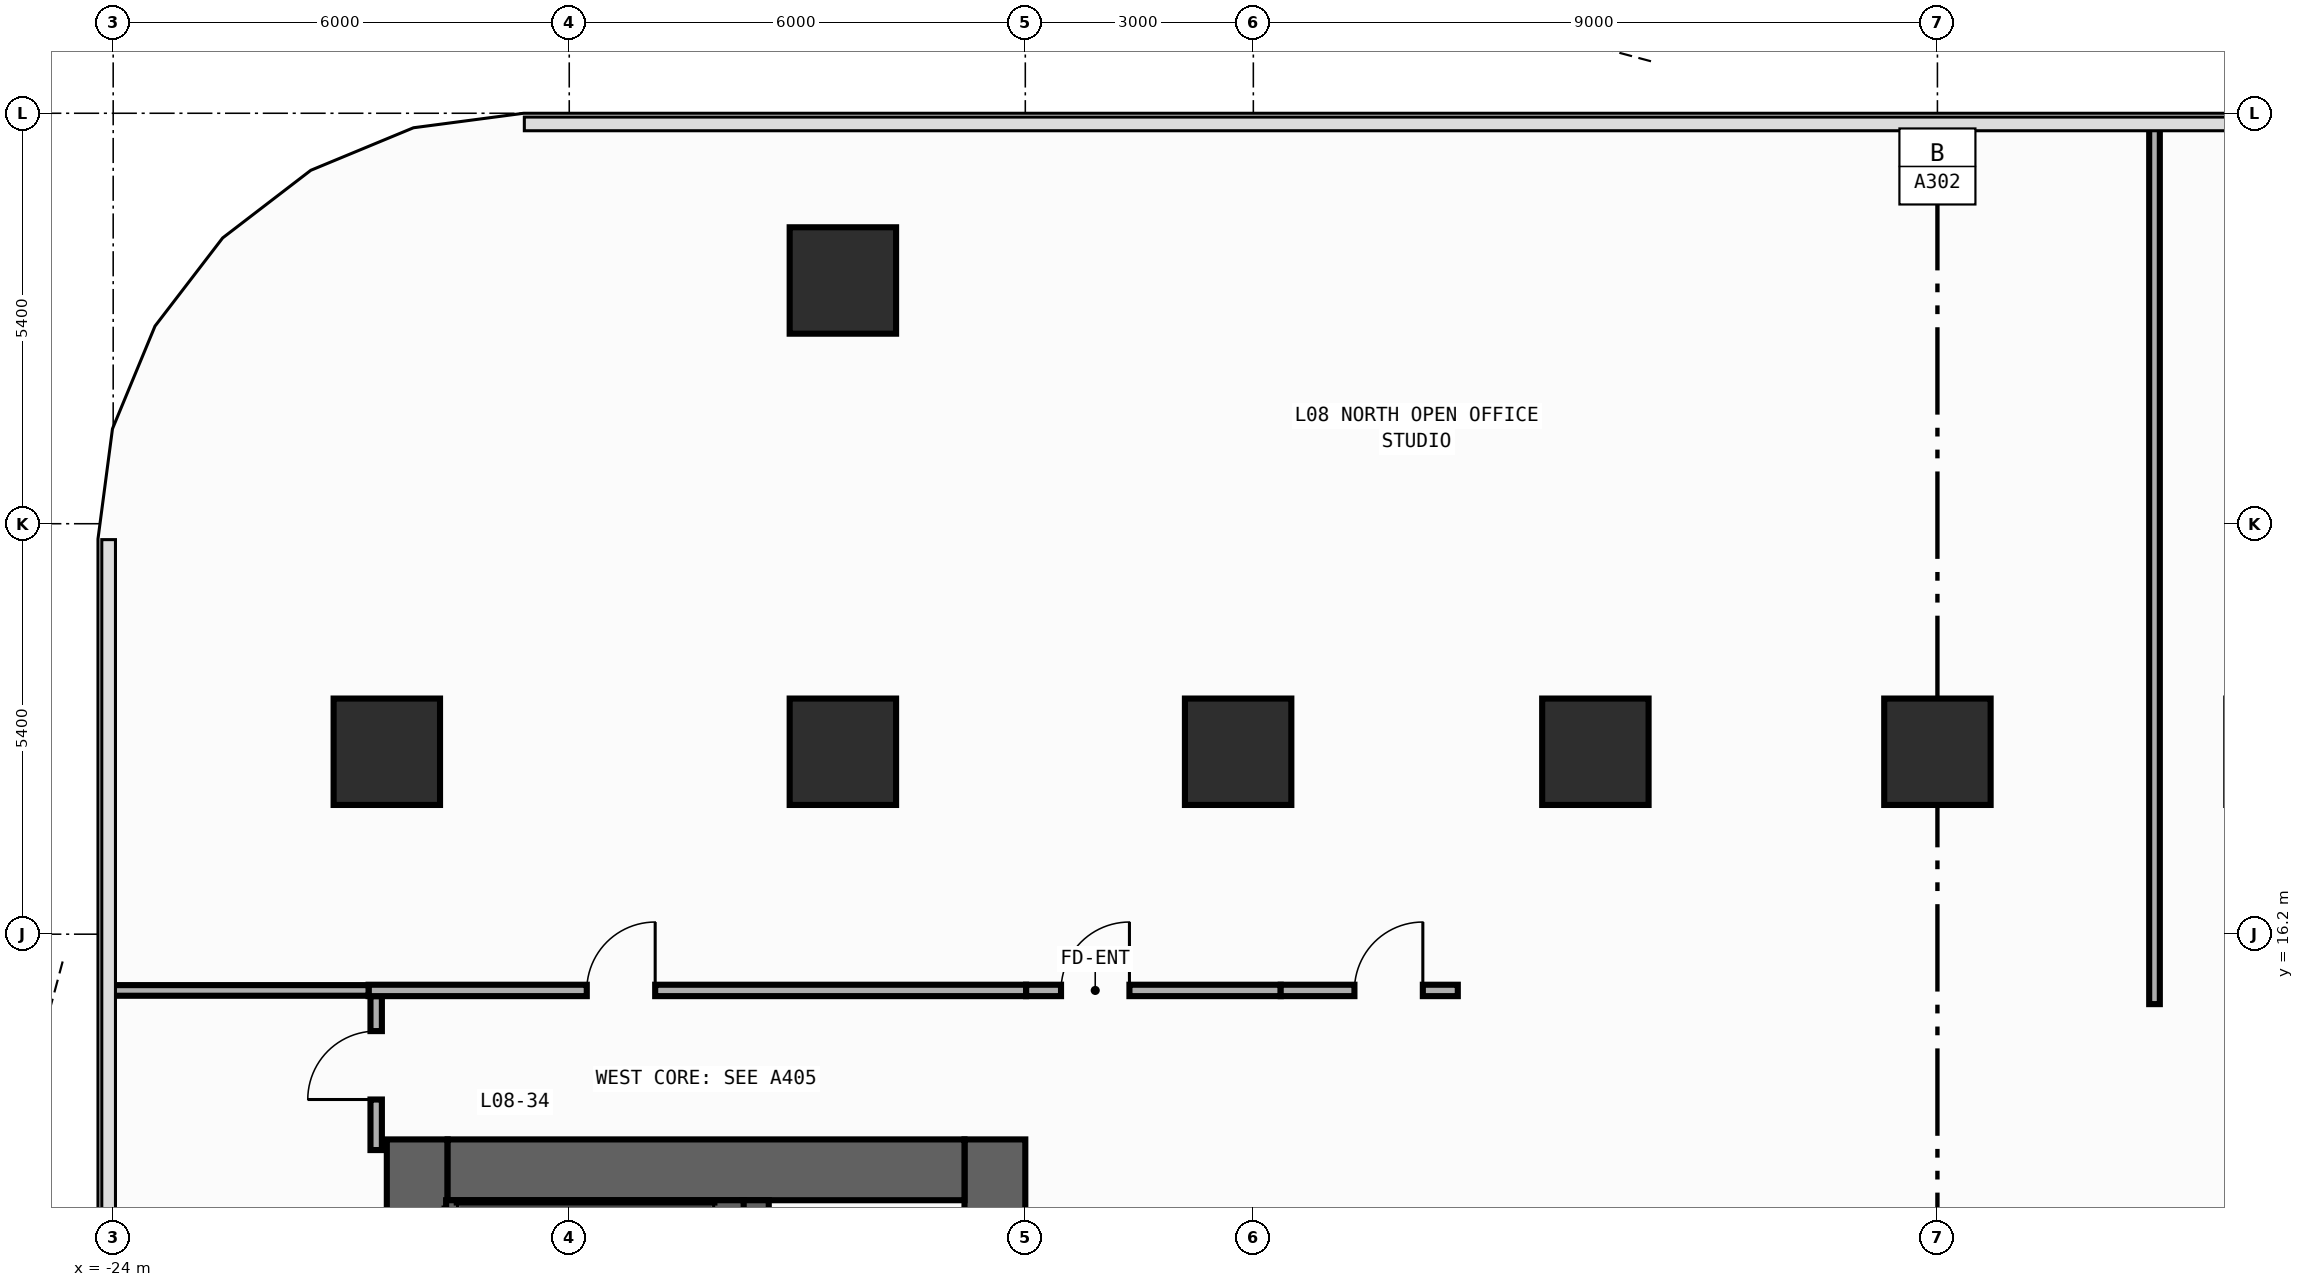
"""IFC4 building model, lengths in metres.
Left out: names, types, materials, properties, quantities, classifications, styles, units other than length and angle.
Written with IfcOpenShell. Run it as: python <this file> out.ifc"""

import sys

from ifc_helpers import new_model, si_unit, direction, frame, frame_2d, origin, origin_2d, place, context, subcontext, project, spatial, rectangle, extrude, element, fill, save


model = new_model("IFC4")
c1 = context("Model", 3, precision=1e-05, world=origin(), true_north=direction((0.0, 1.0)))
c2 = subcontext(c1, "Body", "Model", "MODEL_VIEW")
j1 = project(units=[si_unit("LENGTHUNIT", "METRE"), si_unit("PLANEANGLEUNIT", "RADIAN")], contexts=[c1])
p1 = place(None, origin())
s1 = spatial("IfcSite", under=j1, at=p1, CompositionType="ELEMENT")
p2 = place(p1, origin())
s2 = spatial("IfcBuilding", under=s1, at=p2, CompositionType="ELEMENT")
p3 = place(p2, frame((0.0, 0.0, 34.4)))
s3 = spatial("IfcBuildingStorey", under=s2, at=p3, CompositionType="ELEMENT", Elevation=34.4)
p4 = place(p3, frame((-20.0, -13.5, 0.0), z_axis=(0.0, 0.0, 1.0), x_axis=(0.0, 1.0, 0.0)))
e1 = element("IfcWall", 1, at=p4, inside=s3, PredefinedType="SHEAR", context=c2, shape_type="SweptSolid", body=[
    extrude(rectangle(XDim=27.0, YDim=0.8, at=frame_2d((13.5, 0.0))), origin(), (0.0, 0.0, 1.0), 3.94),
])
p5 = place(p3, frame((-12.4, -13.5, 0.0), z_axis=(0.0, 0.0, 1.0), x_axis=(0.0, 1.0, 0.0)))
e2 = element("IfcWall", 2, at=p5, inside=s3, PredefinedType="SHEAR", context=c2, shape_type="SweptSolid", body=[
    extrude(rectangle(XDim=27.0, YDim=0.8, at=frame_2d((13.5, 0.0))), origin(), (0.0, 0.0, 1.0), 3.94),
])
p6 = place(p5, frame((21.55, 0.0, 0.0)))
e3 = element("IfcOpeningElement", 3, at=p6, cuts=e2, PredefinedType="OPENING", context=c2, shape_type="SweptSolid", body=[
    extrude(rectangle(XDim=1.1, YDim=2.2, at=frame_2d((0.55, 1.1))), frame((0.0, 0.41, 0.0), z_axis=(0.0, -1.0, 0.0), x_axis=(1.0, 0.0, 0.0)), (0.0, 0.0, 1.0), 0.82),
])
p7 = place(p5, frame((18.35, 0.0, 0.0)))
e4 = element("IfcOpeningElement", 4, at=p7, cuts=e2, PredefinedType="OPENING", context=c2, shape_type="SweptSolid", body=[
    extrude(rectangle(XDim=1.1, YDim=2.2, at=frame_2d((0.55, 1.1))), frame((0.0, 0.41, 0.0), z_axis=(0.0, -1.0, 0.0), x_axis=(1.0, 0.0, 0.0)), (0.0, 0.0, 1.0), 0.82),
])
p8 = place(p5, frame((15.15, 0.0, 0.0)))
e5 = element("IfcOpeningElement", 5, at=p8, cuts=e2, PredefinedType="OPENING", context=c2, shape_type="SweptSolid", body=[
    extrude(rectangle(XDim=1.1, YDim=2.2, at=frame_2d((0.55, 1.1))), frame((0.0, 0.41, 0.0), z_axis=(0.0, -1.0, 0.0), x_axis=(1.0, 0.0, 0.0)), (0.0, 0.0, 1.0), 0.82),
])
p9 = place(p5, frame((10.35, 0.0, 0.0)))
e6 = element("IfcOpeningElement", 6, at=p9, cuts=e2, PredefinedType="OPENING", context=c2, shape_type="SweptSolid", body=[
    extrude(rectangle(XDim=1.1, YDim=2.2, at=frame_2d((0.55, 1.1))), frame((0.0, 0.41, 0.0), z_axis=(0.0, -1.0, 0.0), x_axis=(1.0, 0.0, 0.0)), (0.0, 0.0, 1.0), 0.82),
])
p10 = place(p5, frame((7.15, 0.0, 0.0)))
e7 = element("IfcOpeningElement", 7, at=p10, cuts=e2, PredefinedType="OPENING", context=c2, shape_type="SweptSolid", body=[
    extrude(rectangle(XDim=1.1, YDim=2.2, at=frame_2d((0.55, 1.1))), frame((0.0, 0.41, 0.0), z_axis=(0.0, -1.0, 0.0), x_axis=(1.0, 0.0, 0.0)), (0.0, 0.0, 1.0), 0.82),
])
p11 = place(p5, frame((3.95, 0.0, 0.0)))
e8 = element("IfcOpeningElement", 8, at=p11, cuts=e2, PredefinedType="OPENING", context=c2, shape_type="SweptSolid", body=[
    extrude(rectangle(XDim=1.1, YDim=2.2, at=frame_2d((0.55, 1.1))), frame((0.0, 0.41, 0.0), z_axis=(0.0, -1.0, 0.0), x_axis=(1.0, 0.0, 0.0)), (0.0, 0.0, 1.0), 0.82),
])
p12 = place(p5, frame((12.725, 0.0, 0.0)))
e9 = element("IfcOpeningElement", 9, at=p12, cuts=e2, PredefinedType="OPENING", context=c2, shape_type="SweptSolid", body=[
    extrude(rectangle(XDim=1.15, YDim=2.2, at=frame_2d((0.575, 1.1))), frame((0.0, 0.41, 0.0), z_axis=(0.0, -1.0, 0.0), x_axis=(1.0, 0.0, 0.0)), (0.0, 0.0, 1.0), 0.82),
])
p13 = place(p5, frame((1.625, 0.0, 0.0)))
e10 = element("IfcOpeningElement", 10, at=p13, cuts=e2, PredefinedType="OPENING", context=c2, shape_type="SweptSolid", body=[
    extrude(rectangle(XDim=0.85, YDim=2.1, at=frame_2d((0.425, 1.05))), frame((0.0, 0.41, 0.0), z_axis=(0.0, -1.0, 0.0), x_axis=(1.0, 0.0, 0.0)), (0.0, 0.0, 1.0), 0.82),
])
p14 = place(p3, frame((-19.6, 13.1, 0.0), z_axis=(0.0, 0.0, 1.0), x_axis=(1.0, 0.0, 0.0)))
e11 = element("IfcWall", 11, at=p14, inside=s3, PredefinedType="SHEAR", context=c2, shape_type="SweptSolid", body=[
    extrude(rectangle(XDim=6.8, YDim=0.8, at=frame_2d((3.4, 0.0))), origin(), (0.0, 0.0, 1.0), 3.94),
])
p15 = place(p3, frame((-15.55, -12.7, 0.0), z_axis=(0.0, 0.0, 1.0), x_axis=(0.0, 1.0, 0.0)))
e12 = element("IfcWall", 12, at=p15, inside=s3, PredefinedType="SHEAR", context=c2, shape_type="SweptSolid", body=[
    extrude(rectangle(XDim=25.4, YDim=0.35, at=frame_2d((12.7, 0.0))), origin(), (0.0, 0.0, 1.0), 3.94),
])
p16 = place(p15, frame((11.925, 0.0, 0.0)))
e13 = element("IfcOpeningElement", 13, at=p16, cuts=e12, PredefinedType="OPENING", context=c2, shape_type="SweptSolid", body=[
    extrude(rectangle(XDim=1.15, YDim=2.2, at=frame_2d((0.575, 1.1))), frame((0.0, 0.185, 0.0), z_axis=(0.0, -1.0, 0.0), x_axis=(1.0, 0.0, 0.0)), (0.0, 0.0, 1.0), 0.37),
])
p17 = place(p15, frame((0.825, 0.0, 0.0)))
e14 = element("IfcOpeningElement", 14, at=p17, cuts=e12, PredefinedType="OPENING", context=c2, shape_type="SweptSolid", body=[
    extrude(rectangle(XDim=0.85, YDim=2.1, at=frame_2d((0.425, 1.05))), frame((0.0, 0.185, 0.0), z_axis=(0.0, -1.0, 0.0), x_axis=(1.0, 0.0, 0.0)), (0.0, 0.0, 1.0), 0.37),
])
p18 = place(p3, frame((-19.62, 12.59, 0.0), z_axis=(0.0, 0.0, 1.0), x_axis=(1.0, 0.0, 0.0)))
e15 = element("IfcWall", 15, at=p18, inside=s3, PredefinedType="SHEAR", context=c2, shape_type="SweptSolid", body=[
    extrude(rectangle(XDim=3.915, YDim=0.22, at=frame_2d((1.958, 0.0))), origin(), (0.0, 0.0, 1.0), 3.94),
])
for number, where, z_axis, x_axis in (
    (16, (-9.2, 18.6, 0.0), (0.0, 0.0, 1.0), (1.0, 0.0, 0.0)),
    (17, (-20.4, 18.6, 0.0), (0.0, 0.0, 1.0), (1.0, 0.0, 0.0)),
    (18, (-14.4, 18.6, 0.0), (0.0, 0.0, 1.0), (1.0, 0.0, 0.0)),
    (19, (-4.5, 18.6, 0.0), (0.0, 0.0, 1.0), (1.0, 0.0, 0.0)),
    (20, (0.0, 18.6, 0.0), (0.0, 0.0, 1.0), (1.0, 0.0, 0.0)),
    (21, (-14.4, 24.8, 0.0), (0.0, 0.0, 1.0), (1.0, 0.0, 0.0)),
):
    element("IfcColumn", number, at=place(p3, frame(where, z_axis=z_axis, x_axis=x_axis)), inside=s3, PredefinedType="COLUMN", context=c2, shape_type="SweptSolid", body=[
        extrude(rectangle(XDim=1.4, YDim=1.4, at=origin_2d()), origin(), (0.0, 0.0, 1.0), 4.2),
    ])
p19 = place(p3, frame((-11.99, 15.46, 0.0), z_axis=(0.0, 0.0, 1.0), x_axis=(1.0, 0.0, 0.0)))
e22 = element("IfcWall", 22, at=p19, inside=s3, PredefinedType="PARTITIONING", context=c2, shape_type="SweptSolid", body=[
    extrude(rectangle(XDim=3.35, YDim=0.15, at=frame_2d((1.675, 0.0))), origin(), (0.0, 0.0, 1.0), 3.94),
])
p20 = place(p19, frame((0.46, 0.0, 0.0)))
e23 = element("IfcOpeningElement", 23, at=p20, cuts=e22, PredefinedType="OPENING", context=c2, shape_type="SweptSolid", body=[
    extrude(rectangle(XDim=0.9, YDim=2.15, at=frame_2d((0.45, 1.075))), frame((0.0, 0.085, 0.0), z_axis=(0.0, -1.0, 0.0), x_axis=(1.0, 0.0, 0.0)), (0.0, 0.0, 1.0), 0.17),
])
p21 = place(p3, frame((-8.64, 15.46, 0.0), z_axis=(0.0, 0.0, 1.0), x_axis=(1.0, 0.0, 0.0)))
e24 = element("IfcWall", 24, at=p21, inside=s3, PredefinedType="PARTITIONING", context=c2, shape_type="SweptSolid", body=[
    extrude(rectangle(XDim=2.33, YDim=0.15, at=frame_2d((1.165, 0.0))), origin(), (0.0, 0.0, 1.0), 3.94),
])
p22 = place(p21, frame((0.97, 0.0, 0.0)))
e25 = element("IfcOpeningElement", 25, at=p22, cuts=e24, PredefinedType="OPENING", context=c2, shape_type="SweptSolid", body=[
    extrude(rectangle(XDim=0.9, YDim=2.15, at=frame_2d((0.45, 1.075))), frame((0.0, 0.085, 0.0), z_axis=(0.0, -1.0, 0.0), x_axis=(1.0, 0.0, 0.0)), (0.0, 0.0, 1.0), 0.17),
])
p23 = place(p3, frame((-20.54, 13.36, 0.0), z_axis=(0.0, 0.0, 1.0), x_axis=(0.0, 1.0, 0.0)))
e26 = element("IfcWall", 26, at=p23, inside=s3, PredefinedType="PARTITIONING", context=c2, shape_type="SweptSolid", body=[
    extrude(rectangle(XDim=2.025, YDim=0.15, at=frame_2d((1.012, 0.0))), origin(), (0.0, 0.0, 1.0), 3.94),
])
p24 = place(p23, frame((0.665, 0.0, 0.0)))
e27 = element("IfcOpeningElement", 27, at=p24, cuts=e26, PredefinedType="OPENING", context=c2, shape_type="SweptSolid", body=[
    extrude(rectangle(XDim=0.9, YDim=2.15, at=frame_2d((0.45, 1.075))), frame((0.0, 0.085, 0.0), z_axis=(0.0, -1.0, 0.0), x_axis=(1.0, 0.0, 0.0)), (0.0, 0.0, 1.0), 0.17),
])
p25 = place(p3, frame((-20.64, 15.46, 0.0), z_axis=(0.0, 0.0, 1.0), x_axis=(1.0, 0.0, 0.0)))
e28 = element("IfcWall", 28, at=p25, inside=s3, PredefinedType="PARTITIONING", context=c2, shape_type="SweptSolid", body=[
    extrude(rectangle(XDim=8.65, YDim=0.15, at=frame_2d((4.325, 0.0))), origin(), (0.0, 0.0, 1.0), 3.94),
])
p26 = place(p25, frame((2.871, 0.0, 0.0)))
e29 = element("IfcOpeningElement", 29, at=p26, cuts=e28, PredefinedType="OPENING", context=c2, shape_type="SweptSolid", body=[
    extrude(rectangle(XDim=0.9, YDim=2.15, at=frame_2d((0.45, 1.075))), frame((0.0, 0.085, 0.0), z_axis=(0.0, -1.0, 0.0), x_axis=(1.0, 0.0, 0.0)), (0.0, 0.0, 1.0), 0.17),
])
p27 = place(p3, frame((-24.055, 15.46, 0.0), z_axis=(0.0, 0.0, 1.0), x_axis=(1.0, 0.0, 0.0)))
e30 = element("IfcWall", 30, at=p27, inside=s3, PredefinedType="PARTITIONING", context=c2, shape_type="SweptSolid", body=[
    extrude(rectangle(XDim=3.415, YDim=0.14, at=frame_2d((1.708, 0.0))), origin(), (0.0, 0.0, 1.0), 3.94),
])
p28 = place(p3, frame((2.856, 15.28, 0.0), z_axis=(0.0, 0.0, 1.0), x_axis=(0.0, 1.0, 0.0)))
e31 = element("IfcWall", 31, at=p28, inside=s3, PredefinedType="PARTITIONING", context=c2, shape_type="SweptSolid", body=[
    extrude(rectangle(XDim=11.575, YDim=0.14, at=frame_2d((5.788, 0.0))), origin(), (0.0, 0.0, 1.0), 3.94),
])
p29 = place(p20, origin())
e32 = element("IfcDoor", 32, at=p29, inside=s3, OperationType="SINGLE_SWING_RIGHT", PredefinedType="DOOR", context=c2, shape_type="SweptSolid", body=[
    extrude(rectangle(XDim=0.9, YDim=2.15, at=frame_2d((0.45, 1.075))), frame((0.0, 0.025, 0.0), z_axis=(0.0, -1.0, 0.0), x_axis=(1.0, 0.0, 0.0)), (0.0, 0.0, 1.0), 0.05),
])
fill(e23, e32)
p30 = place(p22, origin())
e33 = element("IfcDoor", 33, at=p30, inside=s3, OperationType="SINGLE_SWING_RIGHT", PredefinedType="DOOR", context=c2, shape_type="SweptSolid", body=[
    extrude(rectangle(XDim=0.9, YDim=2.15, at=frame_2d((0.45, 1.075))), frame((0.0, 0.025, 0.0), z_axis=(0.0, -1.0, 0.0), x_axis=(1.0, 0.0, 0.0)), (0.0, 0.0, 1.0), 0.05),
])
fill(e25, e33)
p31 = place(p24, origin())
e34 = element("IfcDoor", 34, at=p31, inside=s3, OperationType="SINGLE_SWING_LEFT", PredefinedType="DOOR", context=c2, shape_type="SweptSolid", body=[
    extrude(rectangle(XDim=0.9, YDim=2.15, at=frame_2d((0.45, 1.075))), frame((0.0, 0.025, 0.0), z_axis=(0.0, -1.0, 0.0), x_axis=(1.0, 0.0, 0.0)), (0.0, 0.0, 1.0), 0.05),
])
fill(e27, e34)
p32 = place(p26, origin())
e35 = element("IfcDoor", 35, at=p32, inside=s3, OperationType="SINGLE_SWING_RIGHT", PredefinedType="DOOR", context=c2, shape_type="SweptSolid", body=[
    extrude(rectangle(XDim=0.9, YDim=2.15, at=frame_2d((0.45, 1.075))), frame((0.0, 0.025, 0.0), z_axis=(0.0, -1.0, 0.0), x_axis=(1.0, 0.0, 0.0)), (0.0, 0.0, 1.0), 0.05),
])
fill(e29, e35)
save(model, sys.argv[1])
